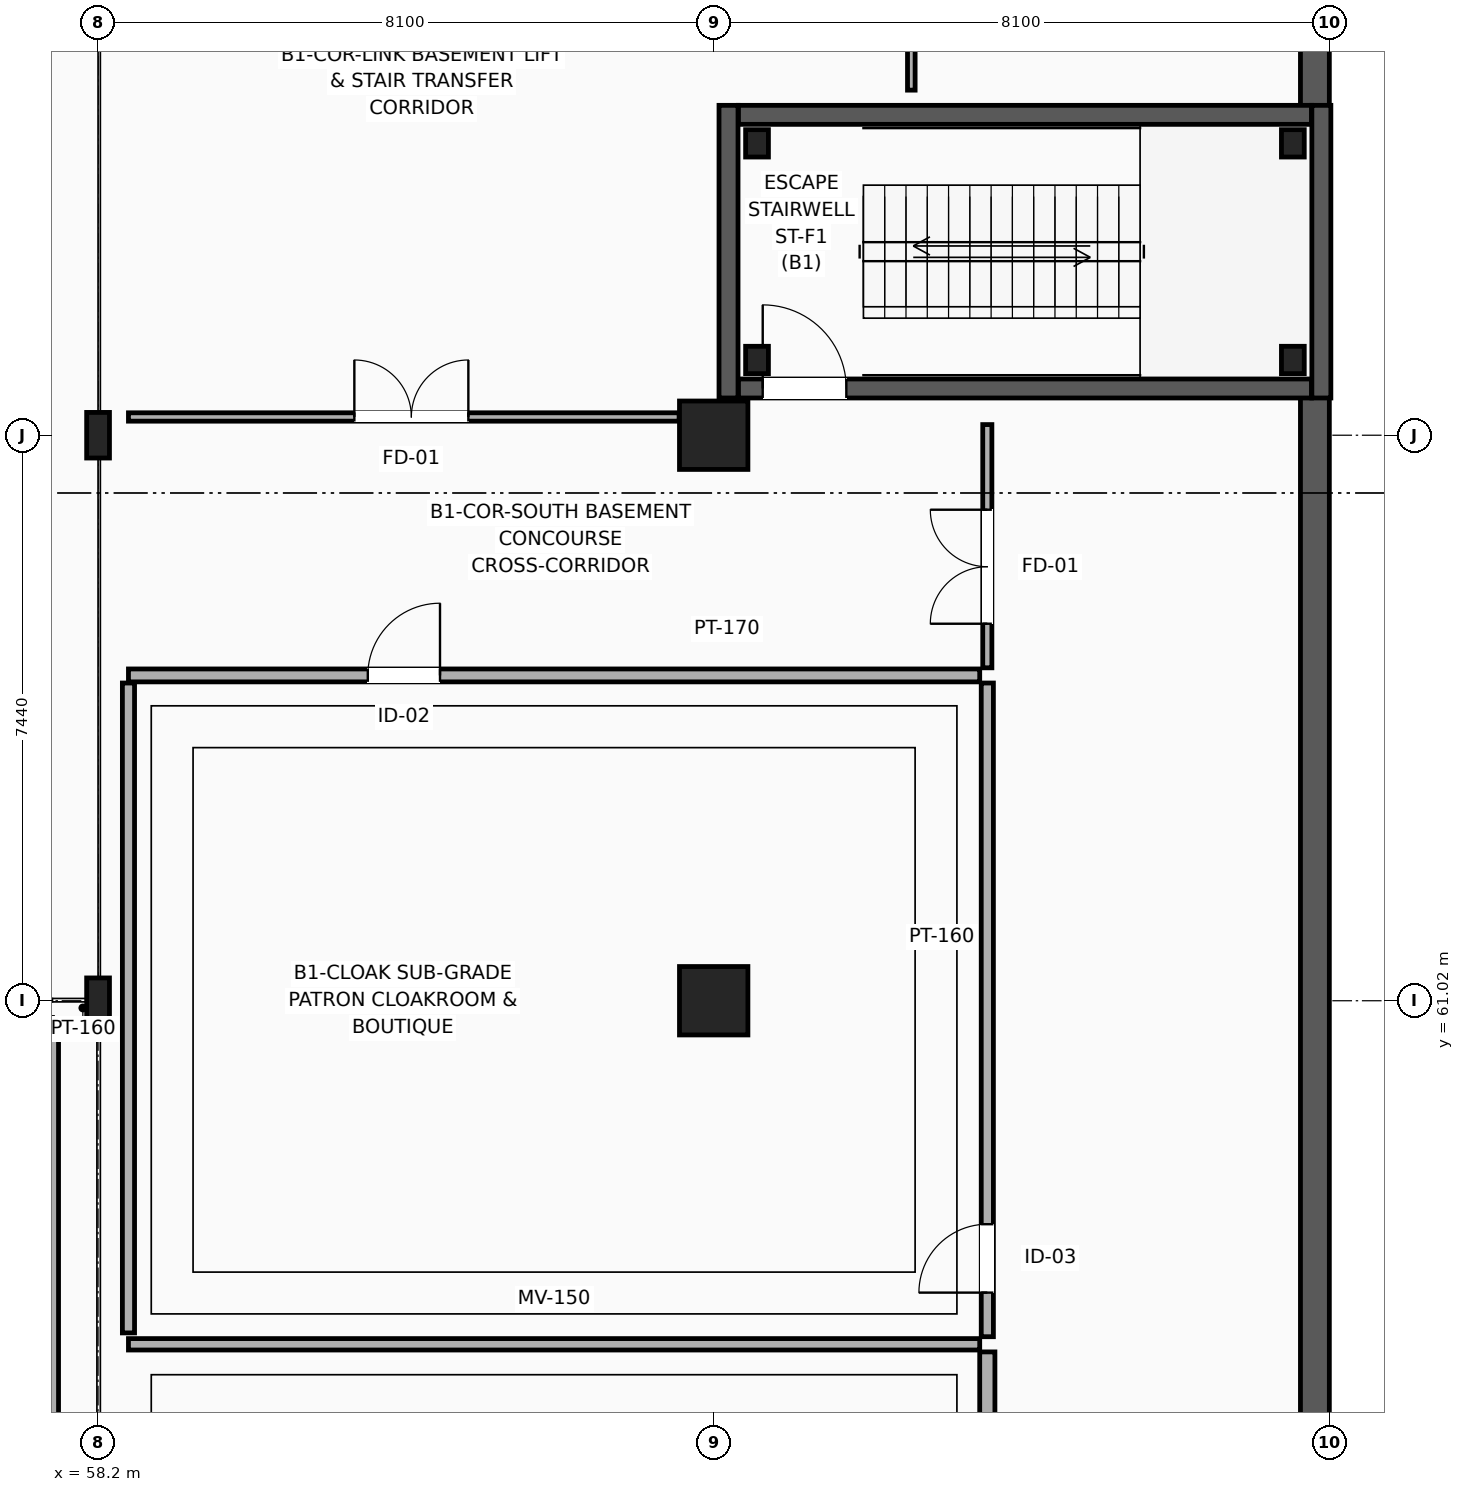
"""IFC4 building model, lengths in metres.
Left out: names, types, materials, properties, quantities, classifications, styles, units other than length and angle.
Written with IfcOpenShell. Run it as: python <this file> out.ifc"""

import sys

from ifc_helpers import new_model, si_unit, direction, frame, frame_2d, origin, origin_2d, place, context, subcontext, project, spatial, rectangle, i_section, extrude, element, fill, save


model = new_model("IFC4")
c1 = context("Model", 3, precision=1e-05, world=origin(), true_north=direction((0.0, 1.0)))
c2 = subcontext(c1, "Body", "Model", "MODEL_VIEW")
j1 = project(units=[si_unit("LENGTHUNIT", "METRE"), si_unit("PLANEANGLEUNIT", "RADIAN")], contexts=[c1])
p1 = place(None, origin())
s1 = spatial("IfcSite", under=j1, at=p1, CompositionType="ELEMENT")
p2 = place(p1, origin())
s2 = spatial("IfcBuilding", under=s1, at=p2, CompositionType="ELEMENT")
p3 = place(p2, frame((0.0, 0.0, -4.8)))
s3 = spatial("IfcBuildingStorey", under=s2, at=p3, CompositionType="ELEMENT", Elevation=-4.8)
for number, where, z_axis, x_axis in (
    (1, (66.87, 69.45, 0.0), (0.0, 0.0, 1.0), (1.0, 0.0, 0.0)),
    (2, (66.87, 72.3, 0.0), (0.0, 0.0, 1.0), (1.0, 0.0, 0.0)),
    (3, (73.92, 69.45, 0.0), (0.0, 0.0, 1.0), (1.0, 0.0, 0.0)),
    (4, (73.92, 72.3, 0.0), (0.0, 0.0, 1.0), (1.0, 0.0, 0.0)),
):
    element("IfcColumn", number, at=place(p3, frame(where, z_axis=z_axis, x_axis=x_axis)), inside=s3, PredefinedType="COLUMN", context=c2, shape_type="SweptSolid", body=[
        extrude(i_section(OverallWidth=0.3, OverallDepth=0.36, WebThickness=0.012, FlangeThickness=0.022, FilletRadius=0.027, at=origin_2d()), origin(), (0.0, 0.0, 1.0), 4.8),
    ])
for number, where, z_axis, x_axis in (
    (5, (58.2, 61.02, 0.0), (0.0, 0.0, 1.0), (1.0, 0.0, 0.0)),
    (6, (58.2, 68.46, 0.0), (0.0, 0.0, 1.0), (1.0, 0.0, 0.0)),
):
    element("IfcColumn", number, at=place(p3, frame(where, z_axis=z_axis, x_axis=x_axis)), inside=s3, PredefinedType="COLUMN", context=c2, shape_type="SweptSolid", body=[
        extrude(i_section(OverallWidth=0.3, OverallDepth=0.6, WebThickness=0.015, FlangeThickness=0.03, FilletRadius=0.027, at=origin_2d()), origin(), (0.0, 0.0, 1.0), 4.8),
    ])
for number, where, z_axis, x_axis in (
    (7, (66.3, 61.02, 0.0), (0.0, 0.0, 1.0), (1.0, 0.0, 0.0)),
    (8, (66.3, 68.46, 0.0), (0.0, 0.0, 1.0), (1.0, 0.0, 0.0)),
):
    element("IfcColumn", number, at=place(p3, frame(where, z_axis=z_axis, x_axis=x_axis)), inside=s3, PredefinedType="COLUMN", context=c2, shape_type="SweptSolid", body=[
        extrude(rectangle(XDim=0.9, YDim=0.9, at=origin_2d()), origin(), (0.0, 0.0, 1.0), 4.8),
    ])
p4 = place(p3, frame((74.21, 38.7, 0.0), z_axis=(0.0, 0.0, 1.0), x_axis=(0.0, 1.0, 0.0)))
e9 = element("IfcWall", 9, at=p4, inside=s3, PredefinedType="USERDEFINED", context=c2, shape_type="SweptSolid", body=[
    extrude(rectangle(XDim=30.37, YDim=0.38, at=frame_2d((15.185, 0.0))), origin(), (0.0, 0.0, 1.0), 4.48),
])
p5 = place(p3, frame((74.21, 72.73, 0.0), z_axis=(0.0, 0.0, 1.0), x_axis=(0.0, 1.0, 0.0)))
e10 = element("IfcWall", 10, at=p5, inside=s3, PredefinedType="USERDEFINED", context=c2, shape_type="SweptSolid", body=[
    extrude(rectangle(XDim=10.61, YDim=0.38, at=frame_2d((5.305, 0.0))), origin(), (0.0, 0.0, 1.0), 4.48),
])
p6 = place(p3, frame((66.625, 69.075, 0.0), z_axis=(0.0, 0.0, 1.0), x_axis=(1.0, 0.0, 0.0)))
e11 = element("IfcWall", 11, at=p6, inside=s3, PredefinedType="SHEAR", context=c2, shape_type="SweptSolid", body=[
    extrude(rectangle(XDim=7.54, YDim=0.25, at=frame_2d((3.77, 0.0))), origin(), (0.0, 0.0, 1.0), 4.48),
])
p7 = place(p6, frame((0.32, 0.0, 0.0)))
e12 = element("IfcOpeningElement", 12, at=p7, cuts=e11, PredefinedType="OPENING", context=c2, shape_type="SweptSolid", body=[
    extrude(rectangle(XDim=1.1, YDim=2.2, at=frame_2d((0.55, 1.1))), frame((0.0, 0.135, 0.0), z_axis=(0.0, -1.0, 0.0), x_axis=(1.0, 0.0, 0.0)), (0.0, 0.0, 1.0), 0.27),
])
p8 = place(p3, frame((66.625, 72.675, 0.0), z_axis=(0.0, 0.0, 1.0), x_axis=(1.0, 0.0, 0.0)))
e13 = element("IfcWall", 13, at=p8, inside=s3, PredefinedType="SHEAR", context=c2, shape_type="SweptSolid", body=[
    extrude(rectangle(XDim=7.54, YDim=0.25, at=frame_2d((3.77, 0.0))), origin(), (0.0, 0.0, 1.0), 4.48),
])
for number, where, z_axis, x_axis in (
    (14, (66.495, 68.95, 0.0), (0.0, 0.0, 1.0), (0.0, 1.0, 0.0)),
    (15, (74.295, 68.95, 0.0), (0.0, 0.0, 1.0), (0.0, 1.0, 0.0)),
):
    element("IfcWall", number, at=place(p3, frame(where, z_axis=z_axis, x_axis=x_axis)), inside=s3, PredefinedType="SHEAR", context=c2, shape_type="SweptSolid", body=[
        extrude(rectangle(XDim=3.85, YDim=0.25, at=frame_2d((1.925, 0.0))), origin(), (0.0, 0.0, 1.0), 4.48),
    ])
p9 = place(p3, frame((58.6, 56.5, 0.0), z_axis=(0.0, 0.0, 1.0), x_axis=(1.0, 0.0, 0.0)))
e16 = element("IfcWall", 16, at=p9, inside=s3, PredefinedType="MOVABLE", context=c2, shape_type="SweptSolid", body=[
    extrude(rectangle(XDim=11.2, YDim=0.15, at=frame_2d((5.6, 0.0))), origin(), (0.0, 0.0, 1.0), 3.412),
])
p10 = place(p3, frame((69.9, 38.97, 0.0), z_axis=(0.0, 0.0, 1.0), x_axis=(0.0, 1.0, 0.0)))
e17 = element("IfcWall", 17, at=p10, inside=s3, PredefinedType="PARTITIONING", context=c2, shape_type="SweptSolid", body=[
    extrude(rectangle(XDim=17.43, YDim=0.2, at=frame_2d((8.715, 0.0))), origin(), (0.0, 0.0, 1.0), 3.512),
])
p11 = place(p10, frame((2.968, 0.0, 0.0)))
e18 = element("IfcOpeningElement", 18, at=p11, cuts=e17, PredefinedType="OPENING", context=c2, shape_type="SweptSolid", body=[
    extrude(rectangle(XDim=0.95, YDim=2.15, at=frame_2d((0.475, 1.075))), frame((0.0, 0.11, 0.0), z_axis=(0.0, -1.0, 0.0), x_axis=(1.0, 0.0, 0.0)), (0.0, 0.0, 1.0), 0.22),
])
p12 = place(p3, frame((58.6, 65.3, 0.0), z_axis=(0.0, 0.0, 1.0), x_axis=(1.0, 0.0, 0.0)))
e19 = element("IfcWall", 19, at=p12, inside=s3, PredefinedType="PARTITIONING", context=c2, shape_type="SweptSolid", body=[
    extrude(rectangle(XDim=11.2, YDim=0.17, at=frame_2d((5.6, 0.0))), origin(), (0.0, 0.0, 1.0), 3.412),
])
p13 = place(p12, frame((3.149, 0.0, 0.0)))
e20 = element("IfcOpeningElement", 20, at=p13, cuts=e19, PredefinedType="OPENING", context=c2, shape_type="SweptSolid", body=[
    extrude(rectangle(XDim=0.95, YDim=2.15, at=frame_2d((0.475, 1.075))), frame((0.0, 0.095, 0.0), z_axis=(0.0, -1.0, 0.0), x_axis=(1.0, 0.0, 0.0)), (0.0, 0.0, 1.0), 0.19),
])
p14 = place(p3, frame((69.9, 56.6, 0.0), z_axis=(0.0, 0.0, 1.0), x_axis=(0.0, 1.0, 0.0)))
e21 = element("IfcWall", 21, at=p14, inside=s3, PredefinedType="PARTITIONING", context=c2, shape_type="SweptSolid", body=[
    extrude(rectangle(XDim=8.6, YDim=0.16, at=frame_2d((4.3, 0.0))), origin(), (0.0, 0.0, 1.0), 3.182),
])
p15 = place(p14, frame((0.58, 0.0, 0.0)))
e22 = element("IfcOpeningElement", 22, at=p15, cuts=e21, PredefinedType="OPENING", context=c2, shape_type="SweptSolid", body=[
    extrude(rectangle(XDim=0.9, YDim=2.1, at=frame_2d((0.45, 1.05))), frame((0.0, 0.09, 0.0), z_axis=(0.0, -1.0, 0.0), x_axis=(1.0, 0.0, 0.0)), (0.0, 0.0, 1.0), 0.18),
])
p16 = place(p3, frame((69.9, 65.4, 0.0), z_axis=(0.0, 0.0, 1.0), x_axis=(0.0, 1.0, 0.0)))
e23 = element("IfcWall", 23, at=p16, inside=s3, PredefinedType="PARTITIONING", context=c2, shape_type="SweptSolid", body=[
    extrude(rectangle(XDim=3.2, YDim=0.12, at=frame_2d((1.6, 0.0))), origin(), (0.0, 0.0, 1.0), 3.182),
])
p17 = place(p16, frame((0.58, 0.0, 0.0)))
e24 = element("IfcOpeningElement", 24, at=p17, cuts=e23, PredefinedType="OPENING", context=c2, shape_type="SweptSolid", body=[
    extrude(rectangle(XDim=1.5, YDim=2.2, at=frame_2d((0.75, 1.1))), frame((0.0, 0.07, 0.0), z_axis=(0.0, -1.0, 0.0), x_axis=(1.0, 0.0, 0.0)), (0.0, 0.0, 1.0), 0.14),
])
p18 = place(p3, frame((58.6, 68.7, 0.0), z_axis=(0.0, 0.0, 1.0), x_axis=(1.0, 0.0, 0.0)))
e25 = element("IfcWall", 25, at=p18, inside=s3, PredefinedType="PARTITIONING", context=c2, shape_type="SweptSolid", body=[
    extrude(rectangle(XDim=7.245, YDim=0.11, at=frame_2d((3.623, 0.0))), origin(), (0.0, 0.0, 1.0), 3.512),
])
p19 = place(p18, frame((2.972, 0.0, 0.0)))
e26 = element("IfcOpeningElement", 26, at=p19, cuts=e25, PredefinedType="OPENING", context=c2, shape_type="SweptSolid", body=[
    extrude(rectangle(XDim=1.5, YDim=2.2, at=frame_2d((0.75, 1.1))), frame((0.0, 0.065, 0.0), z_axis=(0.0, -1.0, 0.0), x_axis=(1.0, 0.0, 0.0)), (0.0, 0.0, 1.0), 0.13),
])
p20 = place(p3, frame((68.9, 73.0, 0.0), z_axis=(0.0, 0.0, 1.0), x_axis=(0.0, 1.0, 0.0)))
e27 = element("IfcWall", 27, at=p20, inside=s3, PredefinedType="PARTITIONING", context=c2, shape_type="SweptSolid", body=[
    extrude(rectangle(XDim=5.6, YDim=0.1, at=frame_2d((2.8, 0.0))), origin(), (0.0, 0.0, 1.0), 3.182),
])
p21 = place(p20, frame((4.12, 0.0, 0.0)))
e28 = element("IfcOpeningElement", 28, at=p21, cuts=e27, PredefinedType="OPENING", context=c2, shape_type="SweptSolid", body=[
    extrude(rectangle(XDim=0.9, YDim=2.1, at=frame_2d((0.45, 1.05))), frame((0.0, 0.06, 0.0), z_axis=(0.0, -1.0, 0.0), x_axis=(1.0, 0.0, 0.0)), (0.0, 0.0, 1.0), 0.12),
])
p22 = place(p3, frame((57.6, 54.5, 0.0), z_axis=(0.0, 0.0, 1.0), x_axis=(0.0, 1.0, 0.0)))
e29 = element("IfcWall", 29, at=p22, inside=s3, PredefinedType="PARTITIONING", context=c2, shape_type="SweptSolid", body=[
    extrude(rectangle(XDim=6.1, YDim=0.16, at=frame_2d((3.05, 0.0))), origin(), (0.0, 0.0, 1.0), 4.46),
])
p23 = place(p3, frame((58.6, 56.65, 0.0), z_axis=(0.0, 0.0, 1.0), x_axis=(0.0, 1.0, 0.0)))
e30 = element("IfcWall", 30, at=p23, inside=s3, PredefinedType="PARTITIONING", context=c2, shape_type="SweptSolid", body=[
    extrude(rectangle(XDim=8.55, YDim=0.16, at=frame_2d((4.275, 0.0))), origin(), (0.0, 0.0, 1.0), 3.512),
])
p24 = place(p7, origin())
e31 = element("IfcDoor", 31, at=p24, inside=s3, OperationType="SINGLE_SWING_LEFT", PredefinedType="DOOR", context=c2, shape_type="SweptSolid", body=[
    extrude(rectangle(XDim=1.1, YDim=2.2, at=frame_2d((0.55, 1.1))), frame((0.0, 0.025, 0.0), z_axis=(0.0, -1.0, 0.0), x_axis=(1.0, 0.0, 0.0)), (0.0, 0.0, 1.0), 0.05),
])
fill(e12, e31)
p25 = place(p13, origin())
e32 = element("IfcDoor", 32, at=p25, inside=s3, OperationType="SINGLE_SWING_RIGHT", PredefinedType="DOOR", context=c2, shape_type="SweptSolid", body=[
    extrude(rectangle(XDim=0.95, YDim=2.15, at=frame_2d((0.475, 1.075))), frame((0.0, 0.025, 0.0), z_axis=(0.0, -1.0, 0.0), x_axis=(1.0, 0.0, 0.0)), (0.0, 0.0, 1.0), 0.05),
])
fill(e20, e32)
p26 = place(p15, origin())
e33 = element("IfcDoor", 33, at=p26, inside=s3, OperationType="SINGLE_SWING_LEFT", PredefinedType="DOOR", context=c2, shape_type="SweptSolid", body=[
    extrude(rectangle(XDim=0.9, YDim=2.1, at=frame_2d((0.45, 1.05))), frame((0.0, 0.025, 0.0), z_axis=(0.0, -1.0, 0.0), x_axis=(1.0, 0.0, 0.0)), (0.0, 0.0, 1.0), 0.05),
])
fill(e22, e33)
p27 = place(p17, origin())
e34 = element("IfcDoor", 34, at=p27, inside=s3, OperationType="DOUBLE_DOOR_SINGLE_SWING", PredefinedType="DOOR", context=c2, shape_type="SweptSolid", body=[
    extrude(rectangle(XDim=1.5, YDim=2.2, at=frame_2d((0.75, 1.1))), frame((0.0, 0.025, 0.0), z_axis=(0.0, -1.0, 0.0), x_axis=(1.0, 0.0, 0.0)), (0.0, 0.0, 1.0), 0.05),
])
fill(e24, e34)
p28 = place(p19, origin())
e35 = element("IfcDoor", 35, at=p28, inside=s3, OperationType="DOUBLE_DOOR_SINGLE_SWING", PredefinedType="DOOR", context=c2, shape_type="SweptSolid", body=[
    extrude(rectangle(XDim=1.5, YDim=2.2, at=frame_2d((0.75, 1.1))), frame((0.0, 0.025, 0.0), z_axis=(0.0, -1.0, 0.0), x_axis=(1.0, 0.0, 0.0)), (0.0, 0.0, 1.0), 0.05),
])
fill(e26, e35)
save(model, sys.argv[1])
